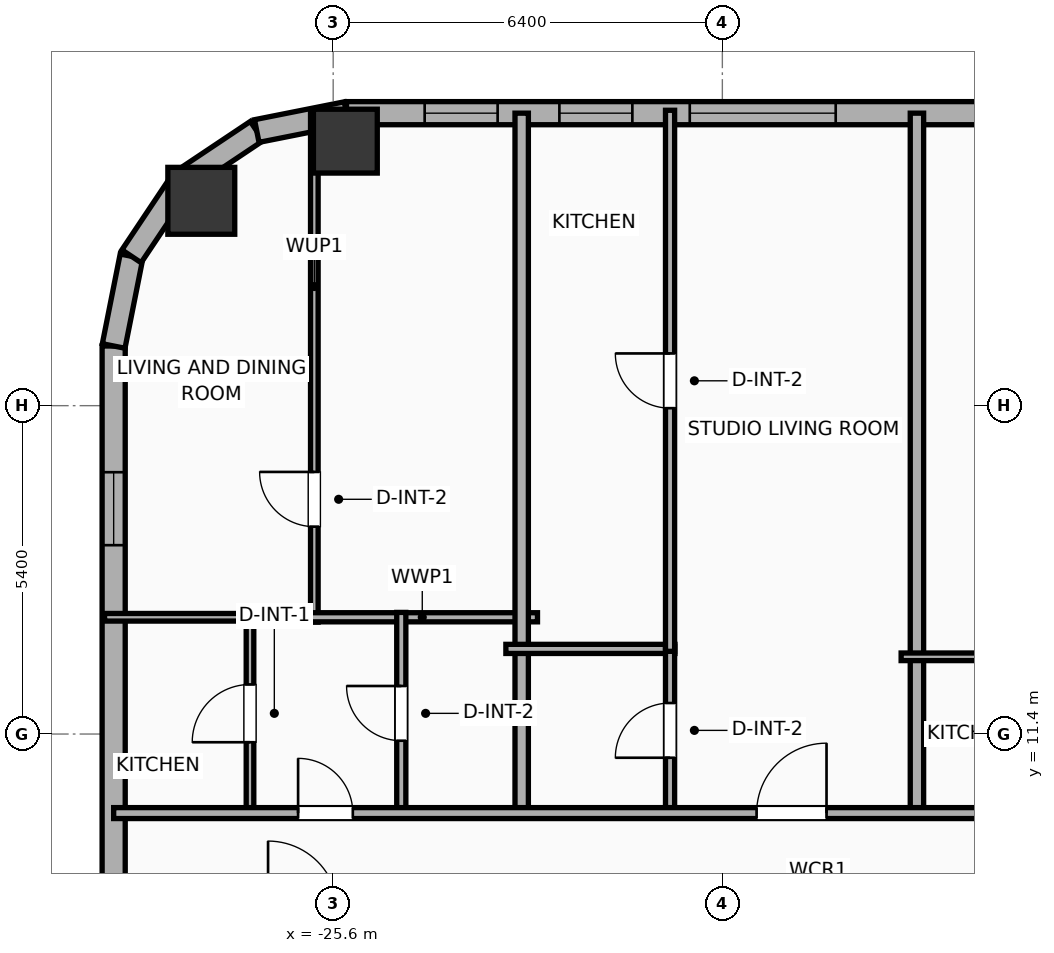
"""IFC4 building model, lengths in metres.
Left out: names, types, materials, properties, quantities, classifications, styles, units other than length and angle.
Written with IfcOpenShell. Run it as: python <this file> out.ifc"""

import sys

from ifc_helpers import new_model, si_unit, direction, frame, frame_2d, origin, origin_2d, place, context, subcontext, project, spatial, rectangle, hollow_rectangle, hollow_circle, extrude, element, fill, save


model = new_model("IFC4")
c1 = context("Model", 3, precision=1e-05, world=origin(), true_north=direction((0.0, 1.0)))
c2 = subcontext(c1, "Body", "Model", "MODEL_VIEW")
j1 = project(units=[si_unit("LENGTHUNIT", "METRE"), si_unit("PLANEANGLEUNIT", "RADIAN")], contexts=[c1])
p1 = place(None, origin())
s1 = spatial("IfcSite", under=j1, at=p1, CompositionType="ELEMENT")
p2 = place(p1, origin())
s2 = spatial("IfcBuilding", under=s1, at=p2, CompositionType="ELEMENT")
p3 = place(p2, frame((0.0, 0.0, 128.7)))
s3 = spatial("IfcBuildingStorey", under=s2, at=p3, CompositionType="ELEMENT", Elevation=128.7)
p4 = place(p3, frame((-25.4, 21.15, 0.0), z_axis=(0.0, 0.0, 1.0), x_axis=(1.0, 0.0, 0.0)))
e1 = element("IfcColumn", 1, at=p4, inside=s3, PredefinedType="COLUMN", context=c2, shape_type="SweptSolid", body=[
    extrude(hollow_rectangle(XDim=1.05, YDim=1.05, WallThickness=0.036, at=origin_2d()), origin(), (0.0, 0.0, 1.0), 3.9),
])
p5 = place(p3, frame((-27.769, 20.169, 0.0), z_axis=(0.0, 0.0, 1.0), x_axis=(1.0, 0.0, 0.0)))
e2 = element("IfcColumn", 2, at=p5, inside=s3, PredefinedType="COLUMN", context=c2, shape_type="SweptSolid", body=[
    extrude(hollow_circle(Radius=0.55, WallThickness=0.036, at=origin_2d()), origin(), (0.0, 0.0, 1.0), 3.9),
])
p6 = place(p3, frame((-29.21, -16.581, 0.0), z_axis=(0.0, 0.0, 1.0), x_axis=(0.0, 1.0, 0.0)))
e3 = element("IfcWall", 3, at=p6, inside=s3, PredefinedType="ELEMENTEDWALL", context=c2, shape_type="SweptSolid", body=[
    extrude(rectangle(XDim=34.363, YDim=0.38, at=frame_2d((17.181, 0.0))), origin(), (0.0, 0.0, 1.0), 3.65),
])
p7 = place(p6, frame((31.087, 0.0, 0.75)))
e4 = element("IfcOpeningElement", 4, at=p7, cuts=e3, PredefinedType="OPENING", context=c2, shape_type="SweptSolid", body=[
    extrude(rectangle(XDim=1.2, YDim=2.05, at=frame_2d((0.6, 1.025))), frame((0.0, 0.2, 0.0), z_axis=(0.0, -1.0, 0.0), x_axis=(1.0, 0.0, 0.0)), (0.0, 0.0, 1.0), 0.4),
])
p8 = place(p6, frame((20.326, 0.0, 0.75)))
e5 = element("IfcOpeningElement", 5, at=p8, cuts=e3, PredefinedType="OPENING", context=c2, shape_type="SweptSolid", body=[
    extrude(rectangle(XDim=1.2, YDim=2.05, at=frame_2d((0.6, 1.025))), frame((0.0, 0.2, 0.0), z_axis=(0.0, -1.0, 0.0), x_axis=(1.0, 0.0, 0.0)), (0.0, 0.0, 1.0), 0.4),
])
p9 = place(p6, frame((11.776, 0.0, 0.75)))
e6 = element("IfcOpeningElement", 6, at=p9, cuts=e3, PredefinedType="OPENING", context=c2, shape_type="SweptSolid", body=[
    extrude(rectangle(XDim=1.2, YDim=2.05, at=frame_2d((0.6, 1.025))), frame((0.0, 0.2, 0.0), z_axis=(0.0, -1.0, 0.0), x_axis=(1.0, 0.0, 0.0)), (0.0, 0.0, 1.0), 0.4),
])
p10 = place(p3, frame((-29.21, 17.781, 0.0), z_axis=(0.0, 0.0, 1.0), x_axis=(0.195086038585, 0.980786132421, 0.0)))
e7 = element("IfcWall", 7, at=p10, inside=s3, PredefinedType="ELEMENTEDWALL", context=c2, shape_type="SweptSolid", body=[
    extrude(rectangle(XDim=1.504, YDim=0.38, at=frame_2d((0.752, 0.0))), origin(), (0.0, 0.0, 1.0), 3.65),
])
p11 = place(p3, frame((-28.917, 19.257, 0.0), z_axis=(0.0, 0.0, 1.0), x_axis=(0.555610286119, 0.831442848281, 0.0)))
e8 = element("IfcWall", 8, at=p11, inside=s3, PredefinedType="ELEMENTEDWALL", context=c2, shape_type="SweptSolid", body=[
    extrude(rectangle(XDim=1.485, YDim=0.38, at=frame_2d((0.743, 0.0))), origin(), (0.0, 0.0, 1.0), 3.65),
])
p12 = place(p3, frame((-28.091, 20.491, 0.0), z_axis=(0.0, 0.0, 1.0), x_axis=(0.831468045563, 0.555572577804, 0.0)))
e9 = element("IfcWall", 9, at=p12, inside=s3, PredefinedType="ELEMENTEDWALL", context=c2, shape_type="SweptSolid", body=[
    extrude(rectangle(XDim=1.485, YDim=0.38, at=frame_2d((0.742, 0.0))), origin(), (0.0, 0.0, 1.0), 3.65),
])
p13 = place(p3, frame((-26.857, 21.316, 0.0), z_axis=(0.0, 0.0, 1.0), x_axis=(0.980755066645, 0.195242155415, 0.0)))
e10 = element("IfcWall", 10, at=p13, inside=s3, PredefinedType="ELEMENTEDWALL", context=c2, shape_type="SweptSolid", body=[
    extrude(rectangle(XDim=1.504, YDim=0.38, at=frame_2d((0.752, 0.0))), origin(), (0.0, 0.0, 1.0), 3.65),
])
p14 = place(p3, frame((-25.381, 21.61, 0.0), z_axis=(0.0, 0.0, 1.0), x_axis=(1.0, 0.0, 0.0)))
e11 = element("IfcWall", 11, at=p14, inside=s3, PredefinedType="ELEMENTEDWALL", context=c2, shape_type="SweptSolid", body=[
    extrude(rectangle(XDim=54.763, YDim=0.38, at=frame_2d((27.381, 0.0))), origin(), (0.0, 0.0, 1.0), 3.65),
])
p15 = place(p14, frame((5.645, 0.0, 0.75)))
e12 = element("IfcOpeningElement", 12, at=p15, cuts=e11, PredefinedType="OPENING", context=c2, shape_type="SweptSolid", body=[
    extrude(rectangle(XDim=2.4, YDim=2.1, at=frame_2d((1.2, 1.05))), frame((0.0, 0.2, 0.0), z_axis=(0.0, -1.0, 0.0), x_axis=(1.0, 0.0, 0.0)), (0.0, 0.0, 1.0), 0.4),
])
p16 = place(p14, frame((45.067, 0.0, 0.75)))
e13 = element("IfcOpeningElement", 13, at=p16, cuts=e11, PredefinedType="OPENING", context=c2, shape_type="SweptSolid", body=[
    extrude(rectangle(XDim=2.4, YDim=2.1, at=frame_2d((1.2, 1.05))), frame((0.0, 0.2, 0.0), z_axis=(0.0, -1.0, 0.0), x_axis=(1.0, 0.0, 0.0)), (0.0, 0.0, 1.0), 0.4),
])
p17 = place(p14, frame((1.286, 0.0, 0.75)))
e14 = element("IfcOpeningElement", 14, at=p17, cuts=e11, PredefinedType="OPENING", context=c2, shape_type="SweptSolid", body=[
    extrude(rectangle(XDim=1.2, YDim=2.05, at=frame_2d((0.6, 1.025))), frame((0.0, 0.2, 0.0), z_axis=(0.0, -1.0, 0.0), x_axis=(1.0, 0.0, 0.0)), (0.0, 0.0, 1.0), 0.4),
])
p18 = place(p14, frame((3.501, 0.0, 0.75)))
e15 = element("IfcOpeningElement", 15, at=p18, cuts=e11, PredefinedType="OPENING", context=c2, shape_type="SweptSolid", body=[
    extrude(rectangle(XDim=1.2, YDim=2.05, at=frame_2d((0.6, 1.025))), frame((0.0, 0.2, 0.0), z_axis=(0.0, -1.0, 0.0), x_axis=(1.0, 0.0, 0.0)), (0.0, 0.0, 1.0), 0.4),
])
p19 = place(p14, frame((12.031, 0.0, 0.75)))
e16 = element("IfcOpeningElement", 16, at=p19, cuts=e11, PredefinedType="OPENING", context=c2, shape_type="SweptSolid", body=[
    extrude(rectangle(XDim=1.2, YDim=2.05, at=frame_2d((0.6, 1.025))), frame((0.0, 0.2, 0.0), z_axis=(0.0, -1.0, 0.0), x_axis=(1.0, 0.0, 0.0)), (0.0, 0.0, 1.0), 0.4),
])
p20 = place(p14, frame((19.805, 0.0, 0.75)))
e17 = element("IfcOpeningElement", 17, at=p20, cuts=e11, PredefinedType="OPENING", context=c2, shape_type="SweptSolid", body=[
    extrude(rectangle(XDim=1.2, YDim=2.05, at=frame_2d((0.6, 1.025))), frame((0.0, 0.2, 0.0), z_axis=(0.0, -1.0, 0.0), x_axis=(1.0, 0.0, 0.0)), (0.0, 0.0, 1.0), 0.4),
])
p21 = place(p14, frame((16.555, 0.0, 0.75)))
e18 = element("IfcOpeningElement", 18, at=p21, cuts=e11, PredefinedType="OPENING", context=c2, shape_type="SweptSolid", body=[
    extrude(rectangle(XDim=1.2, YDim=2.05, at=frame_2d((0.6, 1.025))), frame((0.0, 0.2, 0.0), z_axis=(0.0, -1.0, 0.0), x_axis=(1.0, 0.0, 0.0)), (0.0, 0.0, 1.0), 0.4),
])
p22 = place(p14, frame((23.866, 0.0, 0.75)))
e19 = element("IfcOpeningElement", 19, at=p22, cuts=e11, PredefinedType="OPENING", context=c2, shape_type="SweptSolid", body=[
    extrude(rectangle(XDim=1.2, YDim=2.05, at=frame_2d((0.6, 1.025))), frame((0.0, 0.2, 0.0), z_axis=(0.0, -1.0, 0.0), x_axis=(1.0, 0.0, 0.0)), (0.0, 0.0, 1.0), 0.4),
])
p23 = place(p14, frame((27.116, 0.0, 0.75)))
e20 = element("IfcOpeningElement", 20, at=p23, cuts=e11, PredefinedType="OPENING", context=c2, shape_type="SweptSolid", body=[
    extrude(rectangle(XDim=1.2, YDim=2.05, at=frame_2d((0.6, 1.025))), frame((0.0, 0.2, 0.0), z_axis=(0.0, -1.0, 0.0), x_axis=(1.0, 0.0, 0.0)), (0.0, 0.0, 1.0), 0.4),
])
p24 = place(p14, frame((30.931, 0.0, 0.75)))
e21 = element("IfcOpeningElement", 21, at=p24, cuts=e11, PredefinedType="OPENING", context=c2, shape_type="SweptSolid", body=[
    extrude(rectangle(XDim=1.2, YDim=2.05, at=frame_2d((0.6, 1.025))), frame((0.0, 0.2, 0.0), z_axis=(0.0, -1.0, 0.0), x_axis=(1.0, 0.0, 0.0)), (0.0, 0.0, 1.0), 0.4),
])
p25 = place(p14, frame((36.811, 0.0, 0.75)))
e22 = element("IfcOpeningElement", 22, at=p25, cuts=e11, PredefinedType="OPENING", context=c2, shape_type="SweptSolid", body=[
    extrude(rectangle(XDim=1.2, YDim=2.05, at=frame_2d((0.6, 1.025))), frame((0.0, 0.2, 0.0), z_axis=(0.0, -1.0, 0.0), x_axis=(1.0, 0.0, 0.0)), (0.0, 0.0, 1.0), 0.4),
])
p26 = place(p14, frame((40.061, 0.0, 0.75)))
e23 = element("IfcOpeningElement", 23, at=p26, cuts=e11, PredefinedType="OPENING", context=c2, shape_type="SweptSolid", body=[
    extrude(rectangle(XDim=1.2, YDim=2.05, at=frame_2d((0.6, 1.025))), frame((0.0, 0.2, 0.0), z_axis=(0.0, -1.0, 0.0), x_axis=(1.0, 0.0, 0.0)), (0.0, 0.0, 1.0), 0.4),
])
p27 = place(p14, frame((50.527, 0.0, 0.75)))
e24 = element("IfcOpeningElement", 24, at=p27, cuts=e11, PredefinedType="OPENING", context=c2, shape_type="SweptSolid", body=[
    extrude(rectangle(XDim=1.2, YDim=2.05, at=frame_2d((0.6, 1.025))), frame((0.0, 0.2, 0.0), z_axis=(0.0, -1.0, 0.0), x_axis=(1.0, 0.0, 0.0)), (0.0, 0.0, 1.0), 0.4),
])
p28 = place(p3, frame((-25.91, 13.24, 0.0), z_axis=(0.0, 0.0, 1.0), x_axis=(0.0, 1.0, 0.0)))
e25 = element("IfcWall", 25, at=p28, inside=s3, PredefinedType="PARTITIONING", context=c2, shape_type="SweptSolid", body=[
    extrude(rectangle(XDim=8.418, YDim=0.125, at=frame_2d((4.209, 0.0))), origin(), (0.0, 0.0, 1.0), 3.65),
])
p29 = place(p28, frame((1.57, 0.0, 0.0)))
e26 = element("IfcOpeningElement", 26, at=p29, cuts=e25, PredefinedType="OPENING", context=c2, shape_type="SweptSolid", body=[
    extrude(rectangle(XDim=0.9, YDim=2.05, at=frame_2d((0.45, 1.025))), frame((0.0, 0.073, 0.0), z_axis=(0.0, -1.0, 0.0), x_axis=(1.0, 0.0, 0.0)), (0.0, 0.0, 1.0), 0.145),
])
p30 = place(p3, frame((-26.03, 13.32, 0.0), z_axis=(0.0, 0.0, 1.0), x_axis=(1.0, 0.0, 0.0)))
e27 = element("IfcWall", 27, at=p30, inside=s3, PredefinedType="PLUMBINGWALL", context=c2, shape_type="SweptSolid", body=[
    extrude(rectangle(XDim=3.79, YDim=0.15, at=frame_2d((1.895, 0.0))), origin(), (0.0, 0.0, 1.0), 3.65),
])
p31 = place(p3, frame((-26.968, 10.08, 0.0), z_axis=(0.0, 0.0, 1.0), x_axis=(0.0, 1.0, 0.0)))
e28 = element("IfcWall", 28, at=p31, inside=s3, PredefinedType="PARTITIONING", context=c2, shape_type="SweptSolid", body=[
    extrude(rectangle(XDim=3.32, YDim=0.125, at=frame_2d((1.66, 0.0))), origin(), (0.0, 0.0, 1.0), 3.65),
])
p32 = place(p31, frame((1.185, 0.0, 0.0)))
e29 = element("IfcOpeningElement", 29, at=p32, cuts=e28, PredefinedType="OPENING", context=c2, shape_type="SweptSolid", body=[
    extrude(rectangle(XDim=0.95, YDim=2.05, at=frame_2d((0.475, 1.025))), frame((0.0, 0.073, 0.0), z_axis=(0.0, -1.0, 0.0), x_axis=(1.0, 0.0, 0.0)), (0.0, 0.0, 1.0), 0.145),
])
p33 = place(p3, frame((-29.36, 13.32, 0.0), z_axis=(0.0, 0.0, 1.0), x_axis=(1.0, 0.0, 0.0)))
e30 = element("IfcWall", 30, at=p33, inside=s3, PredefinedType="PARTITIONING", context=c2, shape_type="SweptSolid", body=[
    extrude(rectangle(XDim=2.512, YDim=0.125, at=frame_2d((1.256, 0.0))), origin(), (0.0, 0.0, 1.0), 3.65),
])
p34 = place(p3, frame((-24.48, 10.08, 0.0), z_axis=(0.0, 0.0, 1.0), x_axis=(0.0, 1.0, 0.0)))
e31 = element("IfcWall", 31, at=p34, inside=s3, PredefinedType="PLUMBINGWALL", context=c2, shape_type="SweptSolid", body=[
    extrude(rectangle(XDim=3.32, YDim=0.15, at=frame_2d((1.66, 0.0))), origin(), (0.0, 0.0, 1.0), 3.65),
])
p35 = place(p34, frame((1.21, 0.0, 0.0)))
e32 = element("IfcOpeningElement", 32, at=p35, cuts=e31, PredefinedType="OPENING", context=c2, shape_type="SweptSolid", body=[
    extrude(rectangle(XDim=0.9, YDim=2.05, at=frame_2d((0.45, 1.025))), frame((0.0, 0.085, 0.0), z_axis=(0.0, -1.0, 0.0), x_axis=(1.0, 0.0, 0.0)), (0.0, 0.0, 1.0), 0.17),
])
p36 = place(p3, frame((-22.5, 10.02, 0.0), z_axis=(0.0, 0.0, 1.0), x_axis=(0.0, 1.0, 0.0)))
e33 = element("IfcWall", 33, at=p36, inside=s3, PredefinedType="PARTITIONING", context=c2, shape_type="SweptSolid", body=[
    extrude(rectangle(XDim=11.59, YDim=0.22, at=frame_2d((5.795, 0.0))), origin(), (0.0, 0.0, 1.0), 3.65),
])
p37 = place(p3, frame((-22.76, 12.8, 0.0), z_axis=(0.0, 0.0, 1.0), x_axis=(1.0, 0.0, 0.0)))
e34 = element("IfcWall", 34, at=p37, inside=s3, PredefinedType="PLUMBINGWALL", context=c2, shape_type="SweptSolid", body=[
    extrude(rectangle(XDim=2.78, YDim=0.15, at=frame_2d((1.39, 0.0))), origin(), (0.0, 0.0, 1.0), 3.65),
])
p38 = place(p3, frame((-20.06, 10.08, 0.0), z_axis=(0.0, 0.0, 1.0), x_axis=(0.0, 1.0, 0.0)))
e35 = element("IfcWall", 35, at=p38, inside=s3, PredefinedType="PLUMBINGWALL", context=c2, shape_type="SweptSolid", body=[
    extrude(rectangle(XDim=2.76, YDim=0.15, at=frame_2d((1.38, 0.0))), origin(), (0.0, 0.0, 1.0), 3.65),
])
p39 = place(p38, frame((0.93, 0.0, 0.0)))
e36 = element("IfcOpeningElement", 36, at=p39, cuts=e35, PredefinedType="OPENING", context=c2, shape_type="SweptSolid", body=[
    extrude(rectangle(XDim=0.9, YDim=2.05, at=frame_2d((0.45, 1.025))), frame((0.0, 0.085, 0.0), z_axis=(0.0, -1.0, 0.0), x_axis=(1.0, 0.0, 0.0)), (0.0, 0.0, 1.0), 0.17),
])
p40 = place(p3, frame((-20.06, 12.76, 0.0), z_axis=(0.0, 0.0, 1.0), x_axis=(0.0, 1.0, 0.0)))
e37 = element("IfcWall", 37, at=p40, inside=s3, PredefinedType="PLUMBINGWALL", context=c2, shape_type="SweptSolid", body=[
    extrude(rectangle(XDim=8.898, YDim=0.15, at=frame_2d((4.449, 0.0))), origin(), (0.0, 0.0, 1.0), 3.65),
])
p41 = place(p40, frame((3.999, 0.0, 0.0)))
e38 = element("IfcOpeningElement", 38, at=p41, cuts=e37, PredefinedType="OPENING", context=c2, shape_type="SweptSolid", body=[
    extrude(rectangle(XDim=0.9, YDim=2.05, at=frame_2d((0.45, 1.025))), frame((0.0, 0.085, 0.0), z_axis=(0.0, -1.0, 0.0), x_axis=(1.0, 0.0, 0.0)), (0.0, 0.0, 1.0), 0.17),
])
p42 = place(p3, frame((-16.0, 10.02, 0.0), z_axis=(0.0, 0.0, 1.0), x_axis=(0.0, 1.0, 0.0)))
e39 = element("IfcWall", 39, at=p42, inside=s3, PredefinedType="PARTITIONING", context=c2, shape_type="SweptSolid", body=[
    extrude(rectangle(XDim=11.59, YDim=0.22, at=frame_2d((5.795, 0.0))), origin(), (0.0, 0.0, 1.0), 3.65),
])
p43 = place(p3, frame((-16.26, 12.67, 0.0), z_axis=(0.0, 0.0, 1.0), x_axis=(1.0, 0.0, 0.0)))
e40 = element("IfcWall", 40, at=p43, inside=s3, PredefinedType="PARTITIONING", context=c2, shape_type="SweptSolid", body=[
    extrude(rectangle(XDim=2.804, YDim=0.125, at=frame_2d((1.402, 0.0))), origin(), (0.0, 0.0, 1.0), 3.65),
])
p44 = place(p3, frame((-29.21, 10.1, 0.0), z_axis=(0.0, 0.0, 1.0), x_axis=(1.0, 0.0, 0.0)))
e41 = element("IfcWall", 41, at=p44, inside=s3, PredefinedType="PARTITIONING", context=c2, shape_type="SweptSolid", body=[
    extrude(rectangle(XDim=62.42, YDim=0.18, at=frame_2d((31.21, 0.0))), origin(), (0.0, 0.0, 1.0), 3.65),
])
p45 = place(p44, frame((3.033, 0.0, 0.0)))
e42 = element("IfcOpeningElement", 42, at=p45, cuts=e41, PredefinedType="OPENING", context=c2, shape_type="SweptSolid", body=[
    extrude(rectangle(XDim=0.9, YDim=2.05, at=frame_2d((0.45, 1.025))), frame((0.0, 0.1, 0.0), z_axis=(0.0, -1.0, 0.0), x_axis=(1.0, 0.0, 0.0)), (0.0, 0.0, 1.0), 0.2),
])
p46 = place(p44, frame((10.573, 0.0, 0.0)))
e43 = element("IfcOpeningElement", 43, at=p46, cuts=e41, PredefinedType="OPENING", context=c2, shape_type="SweptSolid", body=[
    extrude(rectangle(XDim=1.15, YDim=2.05, at=frame_2d((0.575, 1.025))), frame((0.0, 0.1, 0.0), z_axis=(0.0, -1.0, 0.0), x_axis=(1.0, 0.0, 0.0)), (0.0, 0.0, 1.0), 0.2),
])
p47 = place(p44, frame((16.135, 0.0, 0.0)))
e44 = element("IfcOpeningElement", 44, at=p47, cuts=e41, PredefinedType="OPENING", context=c2, shape_type="SweptSolid", body=[
    extrude(rectangle(XDim=0.9, YDim=2.05, at=frame_2d((0.45, 1.025))), frame((0.0, 0.1, 0.0), z_axis=(0.0, -1.0, 0.0), x_axis=(1.0, 0.0, 0.0)), (0.0, 0.0, 1.0), 0.2),
])
p48 = place(p44, frame((23.632, 0.0, 0.0)))
e45 = element("IfcOpeningElement", 45, at=p48, cuts=e41, PredefinedType="OPENING", context=c2, shape_type="SweptSolid", body=[
    extrude(rectangle(XDim=1.15, YDim=2.05, at=frame_2d((0.575, 1.025))), frame((0.0, 0.1, 0.0), z_axis=(0.0, -1.0, 0.0), x_axis=(1.0, 0.0, 0.0)), (0.0, 0.0, 1.0), 0.2),
])
p49 = place(p44, frame((27.751, 0.0, 0.0)))
e46 = element("IfcOpeningElement", 46, at=p49, cuts=e41, PredefinedType="OPENING", context=c2, shape_type="SweptSolid", body=[
    extrude(rectangle(XDim=1.15, YDim=2.05, at=frame_2d((0.575, 1.025))), frame((0.0, 0.1, 0.0), z_axis=(0.0, -1.0, 0.0), x_axis=(1.0, 0.0, 0.0)), (0.0, 0.0, 1.0), 0.2),
])
p50 = place(p44, frame((35.635, 0.0, 0.0)))
e47 = element("IfcOpeningElement", 47, at=p50, cuts=e41, PredefinedType="OPENING", context=c2, shape_type="SweptSolid", body=[
    extrude(rectangle(XDim=0.9, YDim=2.05, at=frame_2d((0.45, 1.025))), frame((0.0, 0.1, 0.0), z_axis=(0.0, -1.0, 0.0), x_axis=(1.0, 0.0, 0.0)), (0.0, 0.0, 1.0), 0.2),
])
p51 = place(p44, frame((40.697, 0.0, 0.0)))
e48 = element("IfcOpeningElement", 48, at=p51, cuts=e41, PredefinedType="OPENING", context=c2, shape_type="SweptSolid", body=[
    extrude(rectangle(XDim=1.15, YDim=2.05, at=frame_2d((0.575, 1.025))), frame((0.0, 0.1, 0.0), z_axis=(0.0, -1.0, 0.0), x_axis=(1.0, 0.0, 0.0)), (0.0, 0.0, 1.0), 0.2),
])
p52 = place(p44, frame((48.637, 0.0, 0.0)))
e49 = element("IfcOpeningElement", 49, at=p52, cuts=e41, PredefinedType="OPENING", context=c2, shape_type="SweptSolid", body=[
    extrude(rectangle(XDim=0.9, YDim=2.05, at=frame_2d((0.45, 1.025))), frame((0.0, 0.1, 0.0), z_axis=(0.0, -1.0, 0.0), x_axis=(1.0, 0.0, 0.0)), (0.0, 0.0, 1.0), 0.2),
])
p53 = place(p44, frame((57.213, 0.0, 0.0)))
e50 = element("IfcOpeningElement", 50, at=p53, cuts=e41, PredefinedType="OPENING", context=c2, shape_type="SweptSolid", body=[
    extrude(rectangle(XDim=1.15, YDim=2.05, at=frame_2d((0.575, 1.025))), frame((0.0, 0.1, 0.0), z_axis=(0.0, -1.0, 0.0), x_axis=(1.0, 0.0, 0.0)), (0.0, 0.0, 1.0), 0.2),
])
p54 = place(p15, origin())
e51 = element("IfcWindow", 51, at=p54, inside=s3, PartitioningType="SINGLE_PANEL", PredefinedType="WINDOW", context=c2, shape_type="SweptSolid", body=[
    extrude(rectangle(XDim=2.4, YDim=2.1, at=frame_2d((1.2, 1.05))), frame((0.0, 0.03, 0.0), z_axis=(0.0, -1.0, 0.0), x_axis=(1.0, 0.0, 0.0)), (0.0, 0.0, 1.0), 0.06),
])
fill(e12, e51)
p55 = place(p7, origin())
e52 = element("IfcWindow", 52, at=p55, inside=s3, PartitioningType="SINGLE_PANEL", PredefinedType="WINDOW", context=c2, shape_type="SweptSolid", body=[
    extrude(rectangle(XDim=1.2, YDim=2.05, at=frame_2d((0.6, 1.025))), frame((0.0, 0.03, 0.0), z_axis=(0.0, -1.0, 0.0), x_axis=(1.0, 0.0, 0.0)), (0.0, 0.0, 1.0), 0.06),
])
fill(e4, e52)
p56 = place(p17, origin())
e53 = element("IfcWindow", 53, at=p56, inside=s3, PartitioningType="SINGLE_PANEL", PredefinedType="WINDOW", context=c2, shape_type="SweptSolid", body=[
    extrude(rectangle(XDim=1.2, YDim=2.05, at=frame_2d((0.6, 1.025))), frame((0.0, 0.03, 0.0), z_axis=(0.0, -1.0, 0.0), x_axis=(1.0, 0.0, 0.0)), (0.0, 0.0, 1.0), 0.06),
])
fill(e14, e53)
p57 = place(p18, origin())
e54 = element("IfcWindow", 54, at=p57, inside=s3, PartitioningType="SINGLE_PANEL", PredefinedType="WINDOW", context=c2, shape_type="SweptSolid", body=[
    extrude(rectangle(XDim=1.2, YDim=2.05, at=frame_2d((0.6, 1.025))), frame((0.0, 0.03, 0.0), z_axis=(0.0, -1.0, 0.0), x_axis=(1.0, 0.0, 0.0)), (0.0, 0.0, 1.0), 0.06),
])
fill(e15, e54)
p58 = place(p29, origin())
e55 = element("IfcDoor", 55, at=p58, inside=s3, OperationType="SINGLE_SWING_RIGHT", PredefinedType="DOOR", context=c2, shape_type="SweptSolid", body=[
    extrude(rectangle(XDim=0.9, YDim=2.05, at=frame_2d((0.45, 1.025))), frame((0.0, 0.025, 0.0), z_axis=(0.0, -1.0, 0.0), x_axis=(1.0, 0.0, 0.0)), (0.0, 0.0, 1.0), 0.05),
])
fill(e26, e55)
p59 = place(p32, origin())
e56 = element("IfcDoor", 56, at=p59, inside=s3, OperationType="SINGLE_SWING_LEFT", PredefinedType="DOOR", context=c2, shape_type="SweptSolid", body=[
    extrude(rectangle(XDim=0.95, YDim=2.05, at=frame_2d((0.475, 1.025))), frame((0.0, 0.025, 0.0), z_axis=(0.0, -1.0, 0.0), x_axis=(1.0, 0.0, 0.0)), (0.0, 0.0, 1.0), 0.05),
])
fill(e29, e56)
p60 = place(p35, origin())
e57 = element("IfcDoor", 57, at=p60, inside=s3, OperationType="SINGLE_SWING_RIGHT", PredefinedType="DOOR", context=c2, shape_type="SweptSolid", body=[
    extrude(rectangle(XDim=0.9, YDim=2.05, at=frame_2d((0.45, 1.025))), frame((0.0, 0.025, 0.0), z_axis=(0.0, -1.0, 0.0), x_axis=(1.0, 0.0, 0.0)), (0.0, 0.0, 1.0), 0.05),
])
fill(e32, e57)
p61 = place(p39, origin())
e58 = element("IfcDoor", 58, at=p61, inside=s3, OperationType="SINGLE_SWING_LEFT", PredefinedType="DOOR", context=c2, shape_type="SweptSolid", body=[
    extrude(rectangle(XDim=0.9, YDim=2.05, at=frame_2d((0.45, 1.025))), frame((0.0, 0.025, 0.0), z_axis=(0.0, -1.0, 0.0), x_axis=(1.0, 0.0, 0.0)), (0.0, 0.0, 1.0), 0.05),
])
fill(e36, e58)
p62 = place(p41, origin())
e59 = element("IfcDoor", 59, at=p62, inside=s3, OperationType="SINGLE_SWING_RIGHT", PredefinedType="DOOR", context=c2, shape_type="SweptSolid", body=[
    extrude(rectangle(XDim=0.9, YDim=2.05, at=frame_2d((0.45, 1.025))), frame((0.0, 0.025, 0.0), z_axis=(0.0, -1.0, 0.0), x_axis=(1.0, 0.0, 0.0)), (0.0, 0.0, 1.0), 0.05),
])
fill(e38, e59)
p63 = place(p45, origin())
e60 = element("IfcDoor", 60, at=p63, inside=s3, OperationType="SINGLE_SWING_LEFT", PredefinedType="DOOR", context=c2, shape_type="SweptSolid", body=[
    extrude(rectangle(XDim=0.9, YDim=2.05, at=frame_2d((0.45, 1.025))), frame((0.0, 0.025, 0.0), z_axis=(0.0, -1.0, 0.0), x_axis=(1.0, 0.0, 0.0)), (0.0, 0.0, 1.0), 0.05),
])
fill(e42, e60)
p64 = place(p46, origin())
e61 = element("IfcDoor", 61, at=p64, inside=s3, OperationType="SINGLE_SWING_RIGHT", PredefinedType="DOOR", context=c2, shape_type="SweptSolid", body=[
    extrude(rectangle(XDim=1.15, YDim=2.05, at=frame_2d((0.575, 1.025))), frame((0.0, 0.025, 0.0), z_axis=(0.0, -1.0, 0.0), x_axis=(1.0, 0.0, 0.0)), (0.0, 0.0, 1.0), 0.05),
])
fill(e43, e61)
save(model, sys.argv[1])
